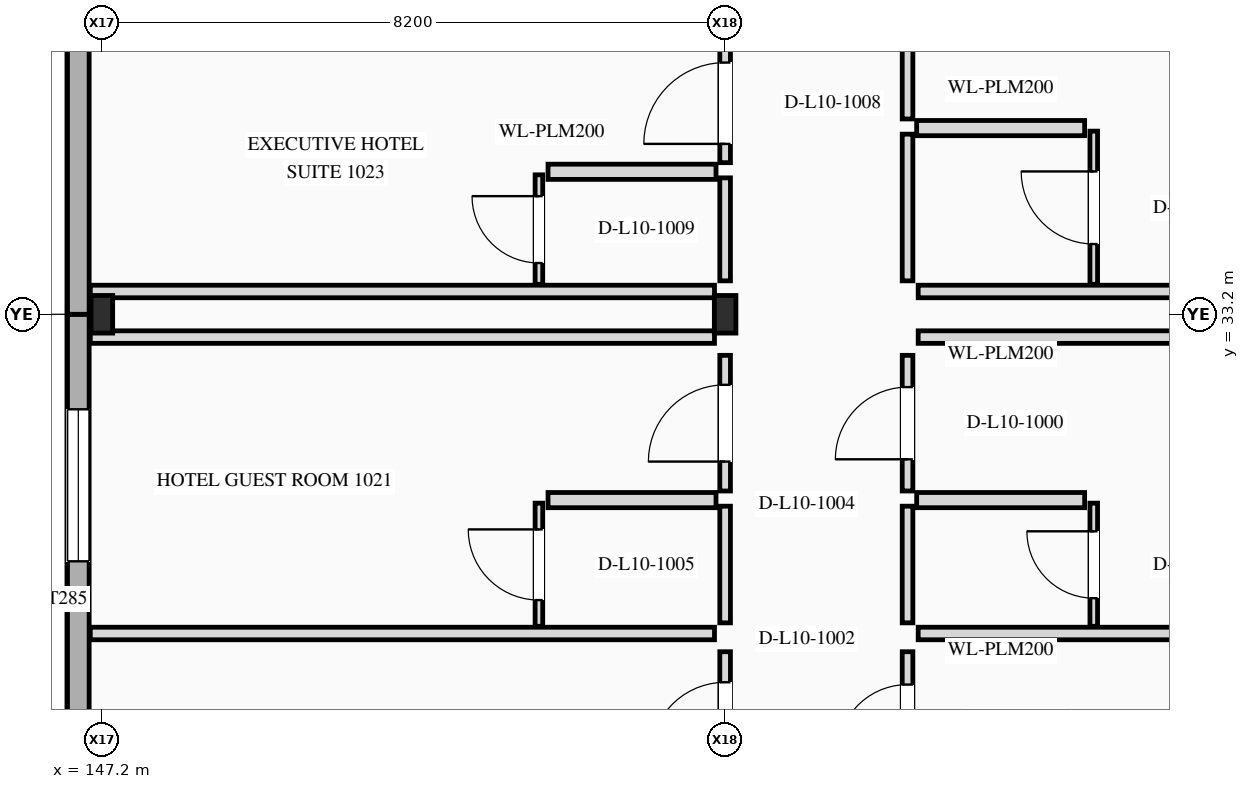
"""IFC4 building model, lengths in metres.
Left out: names, types, materials, properties, quantities, classifications, styles, units other than length and angle.
Written with IfcOpenShell. Run it as: python <this file> out.ifc"""

import sys

from ifc_helpers import new_model, si_unit, direction, frame, frame_2d, origin, origin_2d, place, context, subcontext, project, spatial, rectangle, i_section, extrude, element, fill, save


model = new_model("IFC4")
c1 = context("Model", 3, precision=1e-05, world=origin(), true_north=direction((0.0, 1.0)))
c2 = subcontext(c1, "Body", "Model", "MODEL_VIEW")
j1 = project(units=[si_unit("LENGTHUNIT", "METRE"), si_unit("PLANEANGLEUNIT", "RADIAN")], contexts=[c1])
p1 = place(None, origin())
s1 = spatial("IfcSite", under=j1, at=p1, CompositionType="ELEMENT")
p2 = place(p1, origin())
s2 = spatial("IfcBuilding", under=s1, at=p2, CompositionType="ELEMENT")
p3 = place(p2, frame((0.0, 0.0, 41.1)))
s3 = spatial("IfcBuildingStorey", under=s2, at=p3, CompositionType="ELEMENT", Elevation=41.1)
for number, where, z_axis, x_axis in (
    (1, (147.2, 33.2, 0.0), (0.0, 0.0, 1.0), (1.0, 0.0, 0.0)),
    (2, (155.4, 33.2, 0.0), (0.0, 0.0, 1.0), (1.0, 0.0, 0.0)),
):
    element("IfcColumn", number, at=place(p3, frame(where, z_axis=z_axis, x_axis=x_axis)), inside=s3, PredefinedType="COLUMN", context=c2, shape_type="SweptSolid", body=[
        extrude(i_section(OverallWidth=0.284, OverallDepth=0.495, WebThickness=0.019, FlangeThickness=0.033, at=origin_2d()), origin(), (0.0, 0.0, 1.0), 3.5),
    ])
p4 = place(p3, frame((146.89, 24.8, 0.0), z_axis=(0.0, 0.0, 1.0), x_axis=(0.0, 1.0, 0.0)))
e3 = element("IfcWall", 3, at=p4, inside=s3, PredefinedType="STANDARD", context=c2, shape_type="SweptSolid", body=[
    extrude(rectangle(XDim=8.4, YDim=0.285, at=frame_2d((4.2, 0.0))), origin(), (0.0, 0.0, 1.0), 3.5),
])
p5 = place(p4, frame((1.425, 0.0, 0.85)))
e4 = element("IfcOpeningElement", 4, at=p5, cuts=e3, PredefinedType="OPENING", context=c2, shape_type="SweptSolid", body=[
    extrude(rectangle(XDim=1.65, YDim=1.75, at=frame_2d((0.825, 0.875))), frame((0.0, 0.152, 0.0), z_axis=(0.0, -1.0, 0.0), x_axis=(1.0, 0.0, 0.0)), (0.0, 0.0, 1.0), 0.305),
])
p6 = place(p4, frame((5.15, 0.0, 0.85)))
e5 = element("IfcOpeningElement", 5, at=p6, cuts=e3, PredefinedType="OPENING", context=c2, shape_type="SweptSolid", body=[
    extrude(rectangle(XDim=2.0, YDim=1.65, at=frame_2d((1.0, 0.825))), frame((0.0, 0.152, 0.0), z_axis=(0.0, -1.0, 0.0), x_axis=(1.0, 0.0, 0.0)), (0.0, 0.0, 1.0), 0.305),
])
p7 = place(p3, frame((146.89, 33.2, 0.0), z_axis=(0.0, 0.0, 1.0), x_axis=(0.0, 1.0, 0.0)))
e6 = element("IfcWall", 6, at=p7, inside=s3, PredefinedType="STANDARD", context=c2, shape_type="SweptSolid", body=[
    extrude(rectangle(XDim=8.4, YDim=0.285, at=frame_2d((4.2, 0.0))), origin(), (0.0, 0.0, 1.0), 3.5),
])
p8 = place(p3, frame((157.8, 26.975, 0.0), z_axis=(0.0, 0.0, 1.0), x_axis=(0.0, 1.0, 0.0)))
e7 = element("IfcWall", 7, at=p8, inside=s3, PredefinedType="PARTITIONING", context=c2, shape_type="SweptSolid", body=[
    extrude(rectangle(XDim=1.785, YDim=0.14, at=frame_2d((0.893, 0.0))), origin(), (0.0, 0.0, 1.0), 2.738),
])
p9 = place(p8, frame((0.433, 0.0, 0.0)))
e8 = element("IfcOpeningElement", 8, at=p9, cuts=e7, PredefinedType="OPENING", context=c2, shape_type="SweptSolid", body=[
    extrude(rectangle(XDim=0.92, YDim=2.3, at=frame_2d((0.46, 1.15))), frame((0.0, 0.08, 0.0), z_axis=(0.0, -1.0, 0.0), x_axis=(1.0, 0.0, 0.0)), (0.0, 0.0, 1.0), 0.16),
])
p10 = place(p3, frame((157.94, 29.0, 0.0), z_axis=(0.0, 0.0, 1.0), x_axis=(1.0, 0.0, 0.0)))
e9 = element("IfcWall", 9, at=p10, inside=s3, PredefinedType="PARTITIONING", context=c2, shape_type="SweptSolid", body=[
    extrude(rectangle(XDim=8.213, YDim=0.165, at=frame_2d((4.106, 0.0))), origin(), (0.0, 0.0, 1.0), 2.57),
])
p11 = place(p3, frame((157.8, 29.14, 0.0), z_axis=(0.0, 0.0, 1.0), x_axis=(0.0, 1.0, 0.0)))
e10 = element("IfcWall", 10, at=p11, inside=s3, PredefinedType="PARTITIONING", context=c2, shape_type="SweptSolid", body=[
    extrude(rectangle(XDim=1.535, YDim=0.14, at=frame_2d((0.768, 0.0))), origin(), (0.0, 0.0, 1.0), 2.738),
])
p12 = place(p3, frame((157.8, 30.875, 0.0), z_axis=(0.0, 0.0, 1.0), x_axis=(0.0, 1.0, 0.0)))
e11 = element("IfcWall", 11, at=p12, inside=s3, PredefinedType="PARTITIONING", context=c2, shape_type="SweptSolid", body=[
    extrude(rectangle(XDim=1.785, YDim=0.14, at=frame_2d((0.893, 0.0))), origin(), (0.0, 0.0, 1.0), 2.738),
])
p13 = place(p12, frame((0.417, 0.0, 0.0)))
e12 = element("IfcOpeningElement", 12, at=p13, cuts=e11, PredefinedType="OPENING", context=c2, shape_type="SweptSolid", body=[
    extrude(rectangle(XDim=0.95, YDim=2.3, at=frame_2d((0.475, 1.15))), frame((0.0, 0.08, 0.0), z_axis=(0.0, -1.0, 0.0), x_axis=(1.0, 0.0, 0.0)), (0.0, 0.0, 1.0), 0.16),
])
p14 = place(p3, frame((157.94, 32.9, 0.0), z_axis=(0.0, 0.0, 1.0), x_axis=(1.0, 0.0, 0.0)))
e13 = element("IfcWall", 13, at=p14, inside=s3, PredefinedType="PARTITIONING", context=c2, shape_type="SweptSolid", body=[
    extrude(rectangle(XDim=8.213, YDim=0.165, at=frame_2d((4.106, 0.0))), origin(), (0.0, 0.0, 1.0), 2.57),
])
p15 = place(p3, frame((157.92, 30.755, 0.0), z_axis=(0.0, 0.0, 1.0), x_axis=(1.0, 0.0, 0.0)))
e14 = element("IfcWall", 14, at=p15, inside=s3, PredefinedType="PLUMBINGWALL", context=c2, shape_type="SweptSolid", body=[
    extrude(rectangle(XDim=2.21, YDim=0.2, at=frame_2d((1.105, 0.0))), origin(), (0.0, 0.0, 1.0), 3.18),
])
p16 = place(p3, frame((160.25, 29.094, 0.0), z_axis=(0.0, 0.0, 1.0), x_axis=(0.0, 1.0, 0.0)))
e15 = element("IfcWall", 15, at=p16, inside=s3, PredefinedType="PARTITIONING", context=c2, shape_type="SweptSolid", body=[
    extrude(rectangle(XDim=1.621, YDim=0.1, at=frame_2d((0.81, 0.0))), origin(), (0.0, 0.0, 1.0), 2.738),
])
p17 = place(p16, frame((0.37, 0.0, 0.0)))
e16 = element("IfcOpeningElement", 16, at=p17, cuts=e15, PredefinedType="OPENING", context=c2, shape_type="SweptSolid", body=[
    extrude(rectangle(XDim=0.88, YDim=2.18, at=frame_2d((0.44, 1.09))), frame((0.0, 0.06, 0.0), z_axis=(0.0, -1.0, 0.0), x_axis=(1.0, 0.0, 0.0)), (0.0, 0.0, 1.0), 0.12),
])
p18 = place(p3, frame((155.4, 26.975, 0.0), z_axis=(0.0, 0.0, 1.0), x_axis=(0.0, 1.0, 0.0)))
e17 = element("IfcWall", 17, at=p18, inside=s3, PredefinedType="PARTITIONING", context=c2, shape_type="SweptSolid", body=[
    extrude(rectangle(XDim=1.785, YDim=0.14, at=frame_2d((0.893, 0.0))), origin(), (0.0, 0.0, 1.0), 2.654),
])
p19 = place(p18, frame((0.403, 0.0, 0.0)))
e18 = element("IfcOpeningElement", 18, at=p19, cuts=e17, PredefinedType="OPENING", context=c2, shape_type="SweptSolid", body=[
    extrude(rectangle(XDim=0.98, YDim=2.35, at=frame_2d((0.49, 1.175))), frame((0.0, 0.08, 0.0), z_axis=(0.0, -1.0, 0.0), x_axis=(1.0, 0.0, 0.0)), (0.0, 0.0, 1.0), 0.16),
])
p20 = place(p3, frame((147.048, 29.0, 0.0), z_axis=(0.0, 0.0, 1.0), x_axis=(1.0, 0.0, 0.0)))
e19 = element("IfcWall", 19, at=p20, inside=s3, PredefinedType="PARTITIONING", context=c2, shape_type="SweptSolid", body=[
    extrude(rectangle(XDim=8.212, YDim=0.165, at=frame_2d((4.106, 0.0))), origin(), (0.0, 0.0, 1.0), 2.654),
])
p21 = place(p3, frame((155.4, 29.14, 0.0), z_axis=(0.0, 0.0, 1.0), x_axis=(0.0, 1.0, 0.0)))
e20 = element("IfcWall", 20, at=p21, inside=s3, PredefinedType="PARTITIONING", context=c2, shape_type="SweptSolid", body=[
    extrude(rectangle(XDim=1.535, YDim=0.14, at=frame_2d((0.768, 0.0))), origin(), (0.0, 0.0, 1.0), 2.654),
])
p22 = place(p3, frame((155.4, 30.875, 0.0), z_axis=(0.0, 0.0, 1.0), x_axis=(0.0, 1.0, 0.0)))
e21 = element("IfcWall", 21, at=p22, inside=s3, PredefinedType="PARTITIONING", context=c2, shape_type="SweptSolid", body=[
    extrude(rectangle(XDim=1.785, YDim=0.14, at=frame_2d((0.893, 0.0))), origin(), (0.0, 0.0, 1.0), 2.654),
])
p23 = place(p22, frame((0.387, 0.0, 0.0)))
e22 = element("IfcOpeningElement", 22, at=p23, cuts=e21, PredefinedType="OPENING", context=c2, shape_type="SweptSolid", body=[
    extrude(rectangle(XDim=1.01, YDim=2.35, at=frame_2d((0.505, 1.175))), frame((0.0, 0.08, 0.0), z_axis=(0.0, -1.0, 0.0), x_axis=(1.0, 0.0, 0.0)), (0.0, 0.0, 1.0), 0.16),
])
p24 = place(p3, frame((147.048, 32.9, 0.0), z_axis=(0.0, 0.0, 1.0), x_axis=(1.0, 0.0, 0.0)))
e23 = element("IfcWall", 23, at=p24, inside=s3, PredefinedType="PARTITIONING", context=c2, shape_type="SweptSolid", body=[
    extrude(rectangle(XDim=8.212, YDim=0.165, at=frame_2d((4.106, 0.0))), origin(), (0.0, 0.0, 1.0), 2.593),
])
p25 = place(p3, frame((153.07, 30.755, 0.0), z_axis=(0.0, 0.0, 1.0), x_axis=(1.0, 0.0, 0.0)))
e24 = element("IfcWall", 24, at=p25, inside=s3, PredefinedType="PLUMBINGWALL", context=c2, shape_type="SweptSolid", body=[
    extrude(rectangle(XDim=2.21, YDim=0.2, at=frame_2d((1.105, 0.0))), origin(), (0.0, 0.0, 1.0), 3.18),
])
p26 = place(p3, frame((152.95, 29.094, 0.0), z_axis=(0.0, 0.0, 1.0), x_axis=(0.0, 1.0, 0.0)))
e25 = element("IfcWall", 25, at=p26, inside=s3, PredefinedType="PARTITIONING", context=c2, shape_type="SweptSolid", body=[
    extrude(rectangle(XDim=1.621, YDim=0.1, at=frame_2d((0.81, 0.0))), origin(), (0.0, 0.0, 1.0), 2.788),
])
p27 = place(p26, frame((0.345, 0.0, 0.0)))
e26 = element("IfcOpeningElement", 26, at=p27, cuts=e25, PredefinedType="OPENING", context=c2, shape_type="SweptSolid", body=[
    extrude(rectangle(XDim=0.93, YDim=2.22, at=frame_2d((0.465, 1.11))), frame((0.0, 0.06, 0.0), z_axis=(0.0, -1.0, 0.0), x_axis=(1.0, 0.0, 0.0)), (0.0, 0.0, 1.0), 0.12),
])
p28 = place(p3, frame((157.8, 33.64, 0.0), z_axis=(0.0, 0.0, 1.0), x_axis=(0.0, 1.0, 0.0)))
e27 = element("IfcWall", 27, at=p28, inside=s3, PredefinedType="PARTITIONING", context=c2, shape_type="SweptSolid", body=[
    extrude(rectangle(XDim=1.93, YDim=0.14, at=frame_2d((0.965, 0.0))), origin(), (0.0, 0.0, 1.0), 3.18),
])
p29 = place(p3, frame((157.8, 35.77, 0.0), z_axis=(0.0, 0.0, 1.0), x_axis=(0.0, 1.0, 0.0)))
e28 = element("IfcWall", 28, at=p29, inside=s3, PredefinedType="PARTITIONING", context=c2, shape_type="SweptSolid", body=[
    extrude(rectangle(XDim=5.29, YDim=0.14, at=frame_2d((2.645, 0.0))), origin(), (0.0, 0.0, 1.0), 3.18),
])
p30 = place(p29, frame((2.125, 0.0, 0.0)))
e29 = element("IfcOpeningElement", 29, at=p30, cuts=e28, PredefinedType="OPENING", context=c2, shape_type="SweptSolid", body=[
    extrude(rectangle(XDim=1.04, YDim=2.4, at=frame_2d((0.52, 1.2))), frame((0.0, 0.08, 0.0), z_axis=(0.0, -1.0, 0.0), x_axis=(1.0, 0.0, 0.0)), (0.0, 0.0, 1.0), 0.16),
])
p31 = place(p3, frame((157.94, 33.5, 0.0), z_axis=(0.0, 0.0, 1.0), x_axis=(1.0, 0.0, 0.0)))
e30 = element("IfcWall", 30, at=p31, inside=s3, PredefinedType="PARTITIONING", context=c2, shape_type="SweptSolid", body=[
    extrude(rectangle(XDim=8.213, YDim=0.165, at=frame_2d((4.106, 0.0))), origin(), (0.0, 0.0, 1.0), 2.57),
])
p32 = place(p3, frame((157.92, 35.65, 0.0), z_axis=(0.0, 0.0, 1.0), x_axis=(1.0, 0.0, 0.0)))
e31 = element("IfcWall", 31, at=p32, inside=s3, PredefinedType="PLUMBINGWALL", context=c2, shape_type="SweptSolid", body=[
    extrude(rectangle(XDim=2.21, YDim=0.2, at=frame_2d((1.105, 0.0))), origin(), (0.0, 0.0, 1.0), 3.18),
])
p33 = place(p3, frame((160.25, 33.594, 0.0), z_axis=(0.0, 0.0, 1.0), x_axis=(0.0, 1.0, 0.0)))
e32 = element("IfcWall", 32, at=p33, inside=s3, PredefinedType="PARTITIONING", context=c2, shape_type="SweptSolid", body=[
    extrude(rectangle(XDim=2.016, YDim=0.1, at=frame_2d((1.008, 0.0))), origin(), (0.0, 0.0, 1.0), 3.18),
])
p34 = place(p33, frame((0.53, 0.0, 0.0)))
e33 = element("IfcOpeningElement", 33, at=p34, cuts=e32, PredefinedType="OPENING", context=c2, shape_type="SweptSolid", body=[
    extrude(rectangle(XDim=0.955, YDim=2.22, at=frame_2d((0.478, 1.11))), frame((0.0, 0.06, 0.0), z_axis=(0.0, -1.0, 0.0), x_axis=(1.0, 0.0, 0.0)), (0.0, 0.0, 1.0), 0.12),
])
p35 = place(p3, frame((155.4, 33.64, 0.0), z_axis=(0.0, 0.0, 1.0), x_axis=(0.0, 1.0, 0.0)))
e34 = element("IfcWall", 34, at=p35, inside=s3, PredefinedType="PARTITIONING", context=c2, shape_type="SweptSolid", body=[
    extrude(rectangle(XDim=1.355, YDim=0.14, at=frame_2d((0.678, 0.0))), origin(), (0.0, 0.0, 1.0), 3.18),
])
p36 = place(p3, frame((155.4, 35.195, 0.0), z_axis=(0.0, 0.0, 1.0), x_axis=(0.0, 1.0, 0.0)))
e35 = element("IfcWall", 35, at=p36, inside=s3, PredefinedType="PARTITIONING", context=c2, shape_type="SweptSolid", body=[
    extrude(rectangle(XDim=1.565, YDim=0.14, at=frame_2d((0.782, 0.0))), origin(), (0.0, 0.0, 1.0), 3.18),
])
p37 = place(p36, frame((0.247, 0.0, 0.0)))
e36 = element("IfcOpeningElement", 36, at=p37, cuts=e35, PredefinedType="OPENING", context=c2, shape_type="SweptSolid", body=[
    extrude(rectangle(XDim=1.07, YDim=2.4, at=frame_2d((0.535, 1.2))), frame((0.0, 0.08, 0.0), z_axis=(0.0, -1.0, 0.0), x_axis=(1.0, 0.0, 0.0)), (0.0, 0.0, 1.0), 0.16),
])
p38 = place(p3, frame((147.048, 33.5, 0.0), z_axis=(0.0, 0.0, 1.0), x_axis=(1.0, 0.0, 0.0)))
e37 = element("IfcWall", 37, at=p38, inside=s3, PredefinedType="PARTITIONING", context=c2, shape_type="SweptSolid", body=[
    extrude(rectangle(XDim=8.212, YDim=0.165, at=frame_2d((4.106, 0.0))), origin(), (0.0, 0.0, 1.0), 2.593),
])
p39 = place(p3, frame((153.07, 35.075, 0.0), z_axis=(0.0, 0.0, 1.0), x_axis=(1.0, 0.0, 0.0)))
e38 = element("IfcWall", 38, at=p39, inside=s3, PredefinedType="PLUMBINGWALL", context=c2, shape_type="SweptSolid", body=[
    extrude(rectangle(XDim=2.21, YDim=0.2, at=frame_2d((1.105, 0.0))), origin(), (0.0, 0.0, 1.0), 3.18),
])
p40 = place(p3, frame((152.95, 33.594, 0.0), z_axis=(0.0, 0.0, 1.0), x_axis=(0.0, 1.0, 0.0)))
e39 = element("IfcWall", 39, at=p40, inside=s3, PredefinedType="PARTITIONING", context=c2, shape_type="SweptSolid", body=[
    extrude(rectangle(XDim=1.44, YDim=0.1, at=frame_2d((0.72, 0.0))), origin(), (0.0, 0.0, 1.0), 3.18),
])
p41 = place(p40, frame((0.28, 0.0, 0.0)))
e40 = element("IfcOpeningElement", 40, at=p41, cuts=e39, PredefinedType="OPENING", context=c2, shape_type="SweptSolid", body=[
    extrude(rectangle(XDim=0.88, YDim=2.1, at=frame_2d((0.44, 1.05))), frame((0.0, 0.06, 0.0), z_axis=(0.0, -1.0, 0.0), x_axis=(1.0, 0.0, 0.0)), (0.0, 0.0, 1.0), 0.12),
])
p42 = place(p6, origin())
e41 = element("IfcWindow", 41, at=p42, inside=s3, PartitioningType="SINGLE_PANEL", PredefinedType="WINDOW", context=c2, shape_type="SweptSolid", body=[
    extrude(rectangle(XDim=2.0, YDim=1.65, at=frame_2d((1.0, 0.825))), frame((0.0, 0.03, 0.0), z_axis=(0.0, -1.0, 0.0), x_axis=(1.0, 0.0, 0.0)), (0.0, 0.0, 1.0), 0.06),
])
fill(e5, e41)
p43 = place(p9, origin())
e42 = element("IfcDoor", 42, at=p43, inside=s3, OperationType="SINGLE_SWING_LEFT", PredefinedType="DOOR", context=c2, shape_type="SweptSolid", body=[
    extrude(rectangle(XDim=0.92, YDim=2.3, at=frame_2d((0.46, 1.15))), frame((0.0, 0.025, 0.0), z_axis=(0.0, -1.0, 0.0), x_axis=(1.0, 0.0, 0.0)), (0.0, 0.0, 1.0), 0.05),
])
fill(e8, e42)
p44 = place(p13, origin())
e43 = element("IfcDoor", 43, at=p44, inside=s3, OperationType="SINGLE_SWING_LEFT", PredefinedType="DOOR", context=c2, shape_type="SweptSolid", body=[
    extrude(rectangle(XDim=0.95, YDim=2.3, at=frame_2d((0.475, 1.15))), frame((0.0, 0.025, 0.0), z_axis=(0.0, -1.0, 0.0), x_axis=(1.0, 0.0, 0.0)), (0.0, 0.0, 1.0), 0.05),
])
fill(e12, e43)
p45 = place(p17, origin())
e44 = element("IfcDoor", 44, at=p45, inside=s3, OperationType="SINGLE_SWING_RIGHT", PredefinedType="DOOR", context=c2, shape_type="SweptSolid", body=[
    extrude(rectangle(XDim=0.88, YDim=2.18, at=frame_2d((0.44, 1.09))), frame((0.0, 0.025, 0.0), z_axis=(0.0, -1.0, 0.0), x_axis=(1.0, 0.0, 0.0)), (0.0, 0.0, 1.0), 0.05),
])
fill(e16, e44)
p46 = place(p19, origin())
e45 = element("IfcDoor", 45, at=p46, inside=s3, OperationType="SINGLE_SWING_LEFT", PredefinedType="DOOR", context=c2, shape_type="SweptSolid", body=[
    extrude(rectangle(XDim=0.98, YDim=2.35, at=frame_2d((0.49, 1.175))), frame((0.0, 0.025, 0.0), z_axis=(0.0, -1.0, 0.0), x_axis=(1.0, 0.0, 0.0)), (0.0, 0.0, 1.0), 0.05),
])
fill(e18, e45)
p47 = place(p23, origin())
e46 = element("IfcDoor", 46, at=p47, inside=s3, OperationType="SINGLE_SWING_LEFT", PredefinedType="DOOR", context=c2, shape_type="SweptSolid", body=[
    extrude(rectangle(XDim=1.01, YDim=2.35, at=frame_2d((0.505, 1.175))), frame((0.0, 0.025, 0.0), z_axis=(0.0, -1.0, 0.0), x_axis=(1.0, 0.0, 0.0)), (0.0, 0.0, 1.0), 0.05),
])
fill(e22, e46)
p48 = place(p27, origin())
e47 = element("IfcDoor", 47, at=p48, inside=s3, OperationType="SINGLE_SWING_RIGHT", PredefinedType="DOOR", context=c2, shape_type="SweptSolid", body=[
    extrude(rectangle(XDim=0.93, YDim=2.22, at=frame_2d((0.465, 1.11))), frame((0.0, 0.025, 0.0), z_axis=(0.0, -1.0, 0.0), x_axis=(1.0, 0.0, 0.0)), (0.0, 0.0, 1.0), 0.05),
])
fill(e26, e47)
p49 = place(p34, origin())
e48 = element("IfcDoor", 48, at=p49, inside=s3, OperationType="SINGLE_SWING_RIGHT", PredefinedType="DOOR", context=c2, shape_type="SweptSolid", body=[
    extrude(rectangle(XDim=0.955, YDim=2.22, at=frame_2d((0.478, 1.11))), frame((0.0, 0.025, 0.0), z_axis=(0.0, -1.0, 0.0), x_axis=(1.0, 0.0, 0.0)), (0.0, 0.0, 1.0), 0.05),
])
fill(e33, e48)
p50 = place(p37, origin())
e49 = element("IfcDoor", 49, at=p50, inside=s3, OperationType="SINGLE_SWING_LEFT", PredefinedType="DOOR", context=c2, shape_type="SweptSolid", body=[
    extrude(rectangle(XDim=1.07, YDim=2.4, at=frame_2d((0.535, 1.2))), frame((0.0, 0.025, 0.0), z_axis=(0.0, -1.0, 0.0), x_axis=(1.0, 0.0, 0.0)), (0.0, 0.0, 1.0), 0.05),
])
fill(e36, e49)
p51 = place(p41, origin())
e50 = element("IfcDoor", 50, at=p51, inside=s3, OperationType="SINGLE_SWING_RIGHT", PredefinedType="DOOR", context=c2, shape_type="SweptSolid", body=[
    extrude(rectangle(XDim=0.88, YDim=2.1, at=frame_2d((0.44, 1.05))), frame((0.0, 0.025, 0.0), z_axis=(0.0, -1.0, 0.0), x_axis=(1.0, 0.0, 0.0)), (0.0, 0.0, 1.0), 0.05),
])
fill(e40, e50)
save(model, sys.argv[1])
